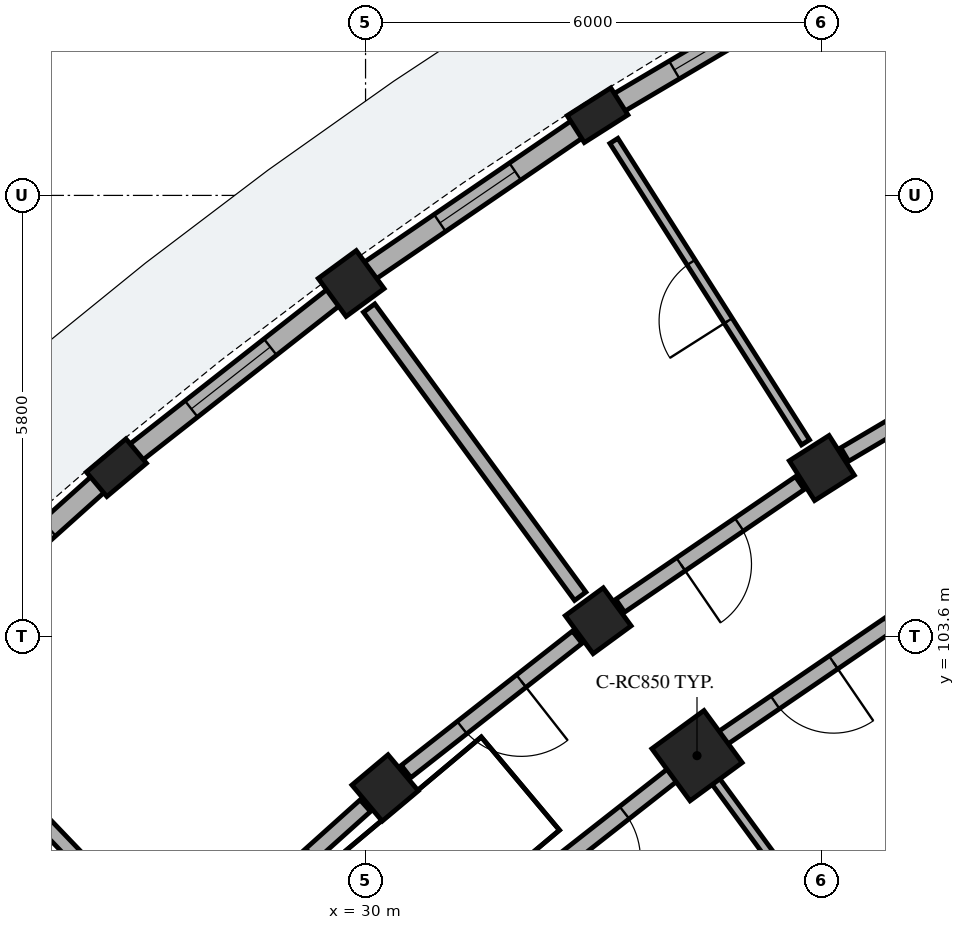
"""IFC4 building model, lengths in metres.
Left out: names, types, materials, properties, quantities, classifications, styles, units other than length and angle.
Written with IfcOpenShell. Run it as: python <this file> out.ifc"""

import sys

from ifc_helpers import new_model, si_unit, direction, frame, frame_2d, origin, origin_2d, place, context, subcontext, project, spatial, rectangle, extrude, element, fill, save


model = new_model("IFC4")
c1 = context("Model", 3, precision=1e-05, world=origin(), true_north=direction((0.0, 1.0)))
c2 = subcontext(c1, "Body", "Model", "MODEL_VIEW")
j1 = project(units=[si_unit("LENGTHUNIT", "METRE"), si_unit("PLANEANGLEUNIT", "RADIAN")], contexts=[c1])
p1 = place(None, origin())
s1 = spatial("IfcSite", under=j1, at=p1, CompositionType="ELEMENT")
p2 = place(p1, origin())
s2 = spatial("IfcBuilding", under=s1, at=p2, CompositionType="ELEMENT")
p3 = place(p2, origin())
s3 = spatial("IfcBuildingStorey", under=s2, at=p3, CompositionType="ELEMENT", Elevation=0.0)
p4 = place(p3, frame((36.003, 105.813, 0.0), z_axis=(0.0, 0.0, 1.0), x_axis=(-0.536481603385, 0.843912015099, 0.0)))
e1 = element("IfcColumn", 1, at=p4, inside=s3, PredefinedType="COLUMN", context=c2, shape_type="SweptSolid", body=[
    extrude(rectangle(XDim=0.62, YDim=0.62, at=origin_2d()), origin(), (0.0, 0.0, 1.0), 4.485),
])
p5 = place(p3, frame((33.052, 110.455, 0.0), z_axis=(0.0, 0.0, 1.0), x_axis=(-0.536481603385, 0.843912015099, 0.0)))
e2 = element("IfcColumn", 2, at=p5, inside=s3, PredefinedType="PILASTER", context=c2, shape_type="SweptSolid", body=[
    extrude(rectangle(XDim=0.42, YDim=0.68, at=origin_2d()), origin(), (0.0, 0.0, 1.0), 4.485),
])
p6 = place(p3, frame((34.361, 102.029, 0.0), z_axis=(0.0, 0.0, 1.0), x_axis=(-0.590918628541, 0.806731166153, 0.0)))
e3 = element("IfcColumn", 3, at=p6, inside=s3, PredefinedType="COLUMN", context=c2, shape_type="SweptSolid", body=[
    extrude(rectangle(XDim=0.85, YDim=0.85, at=origin_2d()), origin(), (0.0, 0.0, 1.0), 4.485),
])
for number, where, z_axis, x_axis in (
    (4, (33.061, 103.804, 0.0), (0.0, 0.0, 1.0), (-0.591, 0.807, 0.0)),
    (5, (29.811, 108.241, 0.0), (0.0, 0.0, 1.0), (-0.591, 0.807, 0.0)),
    (6, (30.257, 101.605, 0.0), (0.0, 0.0, 1.0), (-0.643, 0.766, 0.0)),
):
    element("IfcColumn", number, at=place(p3, frame(where, z_axis=z_axis, x_axis=x_axis)), inside=s3, PredefinedType="COLUMN", context=c2, shape_type="SweptSolid", body=[
        extrude(rectangle(XDim=0.62, YDim=0.62, at=origin_2d()), origin(), (0.0, 0.0, 1.0), 4.485),
    ])
p7 = place(p3, frame((26.722, 105.818, 0.0), z_axis=(0.0, 0.0, 1.0), x_axis=(-0.642787636427, 0.766044420681, 0.0)))
e7 = element("IfcColumn", 7, at=p7, inside=s3, PredefinedType="PILASTER", context=c2, shape_type="SweptSolid", body=[
    extrude(rectangle(XDim=0.42, YDim=0.68, at=origin_2d()), origin(), (0.0, 0.0, 1.0), 4.485),
])
p8 = place(p3, frame((36.192, 112.308, 0.0), z_axis=(0.0, 0.0, 1.0), x_axis=(-0.861120000949, -0.508401754487, 0.0)))
e8 = element("IfcWall", 8, at=p8, inside=s3, PredefinedType="SOLIDWALL", context=c2, shape_type="SweptSolid", body=[
    extrude(rectangle(XDim=3.466, YDim=0.27, at=frame_2d((1.733, 0.0))), origin(), (0.0, 0.0, 1.0), 3.755),
])
p9 = place(p8, frame((0.993, 0.0, 0.55)))
e9 = element("IfcOpeningElement", 9, at=p9, cuts=e8, PredefinedType="OPENING", context=c2, shape_type="SweptSolid", body=[
    extrude(rectangle(XDim=1.48, YDim=1.62, at=frame_2d((0.74, 0.81))), frame((0.0, 0.145, 0.0), z_axis=(0.0, -1.0, 0.0), x_axis=(1.0, 0.0, 0.0)), (0.0, 0.0, 1.0), 0.29),
])
p10 = place(p3, frame((32.904, 110.354, 0.0), z_axis=(0.0, 0.0, 1.0), x_axis=(-0.825744165268, -0.564044832904, 0.0)))
e10 = element("IfcWall", 10, at=p10, inside=s3, PredefinedType="SOLIDWALL", context=c2, shape_type="SweptSolid", body=[
    extrude(rectangle(XDim=3.466, YDim=0.27, at=frame_2d((1.733, 0.0))), origin(), (0.0, 0.0, 1.0), 3.755),
])
p11 = place(p10, frame((1.133, 0.0, 0.55)))
e11 = element("IfcOpeningElement", 11, at=p11, cuts=e10, PredefinedType="OPENING", context=c2, shape_type="SweptSolid", body=[
    extrude(rectangle(XDim=1.2, YDim=1.51, at=frame_2d((0.6, 0.755))), frame((0.0, 0.145, 0.0), z_axis=(0.0, -1.0, 0.0), x_axis=(1.0, 0.0, 0.0)), (0.0, 0.0, 1.0), 0.29),
])
p12 = place(p3, frame((29.591, 108.068, 0.0), z_axis=(0.0, 0.0, 1.0), x_axis=(-0.786811832484, -0.617192952214, 0.0)))
e12 = element("IfcWall", 12, at=p12, inside=s3, PredefinedType="SOLIDWALL", context=c2, shape_type="SweptSolid", body=[
    extrude(rectangle(XDim=3.466, YDim=0.27, at=frame_2d((1.733, 0.0))), origin(), (0.0, 0.0, 1.0), 3.755),
])
p13 = place(p12, frame((1.073, 0.0, 0.55)))
e13 = element("IfcOpeningElement", 13, at=p13, cuts=e12, PredefinedType="OPENING", context=c2, shape_type="SweptSolid", body=[
    extrude(rectangle(XDim=1.32, YDim=1.585, at=frame_2d((0.66, 0.792))), frame((0.0, 0.145, 0.0), z_axis=(0.0, -1.0, 0.0), x_axis=(1.0, 0.0, 0.0)), (0.0, 0.0, 1.0), 0.29),
])
p14 = place(p3, frame((26.588, 105.698, 0.0), z_axis=(0.0, 0.0, 1.0), x_axis=(-0.744424533251, -0.667706607945, 0.0)))
e14 = element("IfcWall", 14, at=p14, inside=s3, PredefinedType="SOLIDWALL", context=c2, shape_type="SweptSolid", body=[
    extrude(rectangle(XDim=3.466, YDim=0.27, at=frame_2d((1.733, 0.0))), origin(), (0.0, 0.0, 1.0), 3.755),
])
p15 = place(p14, frame((1.013, 0.0, 0.55)))
e15 = element("IfcOpeningElement", 15, at=p15, cuts=e14, PredefinedType="OPENING", context=c2, shape_type="SweptSolid", body=[
    extrude(rectangle(XDim=1.44, YDim=1.66, at=frame_2d((0.72, 0.83))), frame((0.0, 0.145, 0.0), z_axis=(0.0, -1.0, 0.0), x_axis=(1.0, 0.0, 0.0)), (0.0, 0.0, 1.0), 0.29),
])
p16 = place(p3, frame((38.77, 107.447, 0.0), z_axis=(0.0, 0.0, 1.0), x_axis=(-0.861113214678, -0.508413248753, 0.0)))
e16 = element("IfcWall", 16, at=p16, inside=s3, PredefinedType="PARTITIONING", context=c2, shape_type="SweptSolid", body=[
    extrude(rectangle(XDim=2.863, YDim=0.205, at=frame_2d((1.432, 0.0))), origin(), (0.0, 0.0, 1.0), 3.1),
])
p17 = place(p16, frame((0.957, 0.0, 0.0)))
e17 = element("IfcOpeningElement", 17, at=p17, cuts=e16, PredefinedType="OPENING", context=c2, shape_type="SweptSolid", body=[
    extrude(rectangle(XDim=0.95, YDim=2.13, at=frame_2d((0.475, 1.065))), frame((0.0, 0.113, 0.0), z_axis=(0.0, -1.0, 0.0), x_axis=(1.0, 0.0, 0.0)), (0.0, 0.0, 1.0), 0.225),
])
p18 = place(p3, frame((35.789, 106.151, 0.0), z_axis=(0.0, 0.0, 1.0), x_axis=(-0.536492262982, 0.843905238614, 0.0)))
e18 = element("IfcWall", 18, at=p18, inside=s3, PredefinedType="PARTITIONING", context=c2, shape_type="SweptSolid", body=[
    extrude(rectangle(XDim=4.7, YDim=0.125, at=frame_2d((2.35, 0.0))), origin(), (0.0, 0.0, 1.0), 3.1),
])
p19 = place(p18, frame((1.895, 0.0, 0.0)))
e19 = element("IfcOpeningElement", 19, at=p19, cuts=e18, PredefinedType="OPENING", context=c2, shape_type="SweptSolid", body=[
    extrude(rectangle(XDim=0.91, YDim=2.1, at=frame_2d((0.455, 1.05))), frame((0.0, 0.073, 0.0), z_axis=(0.0, -1.0, 0.0), x_axis=(1.0, 0.0, 0.0)), (0.0, 0.0, 1.0), 0.145),
])
p20 = place(p3, frame((35.714, 105.616, 0.0), z_axis=(0.0, 0.0, 1.0), x_axis=(-0.825779671787, -0.563992848947, 0.0)))
e20 = element("IfcWall", 20, at=p20, inside=s3, PredefinedType="PARTITIONING", context=c2, shape_type="SweptSolid", body=[
    extrude(rectangle(XDim=2.863, YDim=0.205, at=frame_2d((1.432, 0.0))), origin(), (0.0, 0.0, 1.0), 3.1),
])
p21 = place(p20, frame((0.967, 0.0, 0.0)))
e21 = element("IfcOpeningElement", 21, at=p21, cuts=e20, PredefinedType="OPENING", context=c2, shape_type="SweptSolid", body=[
    extrude(rectangle(XDim=0.93, YDim=2.12, at=frame_2d((0.465, 1.06))), frame((0.0, 0.113, 0.0), z_axis=(0.0, -1.0, 0.0), x_axis=(1.0, 0.0, 0.0)), (0.0, 0.0, 1.0), 0.225),
])
p22 = place(p3, frame((36.895, 103.76, 0.0), z_axis=(0.0, 0.0, 1.0), x_axis=(-0.825752009056, -0.56403334967, 0.0)))
e22 = element("IfcWall", 22, at=p22, inside=s3, PredefinedType="PARTITIONING", context=c2, shape_type="SweptSolid", body=[
    extrude(rectangle(XDim=2.718, YDim=0.205, at=frame_2d((1.359, 0.0))), origin(), (0.0, 0.0, 1.0), 3.1),
])
p23 = place(p22, frame((0.894, 0.0, 0.0)))
e23 = element("IfcOpeningElement", 23, at=p23, cuts=e22, PredefinedType="OPENING", context=c2, shape_type="SweptSolid", body=[
    extrude(rectangle(XDim=0.93, YDim=2.12, at=frame_2d((0.465, 1.06))), frame((0.0, 0.113, 0.0), z_axis=(0.0, -1.0, 0.0), x_axis=(1.0, 0.0, 0.0)), (0.0, 0.0, 1.0), 0.225),
])
p24 = place(p3, frame((32.824, 104.126, 0.0), z_axis=(0.0, 0.0, 1.0), x_axis=(-0.590910940129, 0.806736797745, 0.0)))
e24 = element("IfcWall", 24, at=p24, inside=s3, PredefinedType="PARTITIONING", context=c2, shape_type="SweptSolid", body=[
    extrude(rectangle(XDim=4.7, YDim=0.185, at=frame_2d((2.35, 0.0))), origin(), (0.0, 0.0, 1.0), 3.1),
])
p25 = place(p3, frame((38.497, 96.382, 0.0), z_axis=(0.0, 0.0, 1.0), x_axis=(-0.590924179316, 0.806727100263, 0.0)))
e25 = element("IfcWall", 25, at=p25, inside=s3, PredefinedType="PARTITIONING", context=c2, shape_type="SweptSolid", body=[
    extrude(rectangle(XDim=6.6, YDim=0.125, at=frame_2d((3.3, 0.0))), origin(), (0.0, 0.0, 1.0), 3.1),
])
p26 = place(p25, frame((2.865, 0.0, 0.0)))
e26 = element("IfcOpeningElement", 26, at=p26, cuts=e25, PredefinedType="OPENING", context=c2, shape_type="SweptSolid", body=[
    extrude(rectangle(XDim=0.87, YDim=2.08, at=frame_2d((0.435, 1.04))), frame((0.0, 0.073, 0.0), z_axis=(0.0, -1.0, 0.0), x_axis=(1.0, 0.0, 0.0)), (0.0, 0.0, 1.0), 0.145),
])
p27 = place(p3, frame((32.785, 103.588, 0.0), z_axis=(0.0, 0.0, 1.0), x_axis=(-0.786806323554, -0.617199975061, 0.0)))
e27 = element("IfcWall", 27, at=p27, inside=s3, PredefinedType="PARTITIONING", context=c2, shape_type="SweptSolid", body=[
    extrude(rectangle(XDim=2.863, YDim=0.205, at=frame_2d((1.432, 0.0))), origin(), (0.0, 0.0, 1.0), 3.1),
])
p28 = place(p27, frame((0.937, 0.0, 0.0)))
e28 = element("IfcOpeningElement", 28, at=p28, cuts=e27, PredefinedType="OPENING", context=c2, shape_type="SweptSolid", body=[
    extrude(rectangle(XDim=0.99, YDim=2.16, at=frame_2d((0.495, 1.08))), frame((0.0, 0.113, 0.0), z_axis=(0.0, -1.0, 0.0), x_axis=(1.0, 0.0, 0.0)), (0.0, 0.0, 1.0), 0.225),
])
p29 = place(p3, frame((34.085, 101.813, 0.0), z_axis=(0.0, 0.0, 1.0), x_axis=(-0.786835457019, -0.617162833924, 0.0)))
e29 = element("IfcWall", 29, at=p29, inside=s3, PredefinedType="PARTITIONING", context=c2, shape_type="SweptSolid", body=[
    extrude(rectangle(XDim=2.718, YDim=0.205, at=frame_2d((1.359, 0.0))), origin(), (0.0, 0.0, 1.0), 3.1),
])
p30 = place(p29, frame((0.864, 0.0, 0.0)))
e30 = element("IfcOpeningElement", 30, at=p30, cuts=e29, PredefinedType="OPENING", context=c2, shape_type="SweptSolid", body=[
    extrude(rectangle(XDim=0.99, YDim=2.16, at=frame_2d((0.495, 1.08))), frame((0.0, 0.113, 0.0), z_axis=(0.0, -1.0, 0.0), x_axis=(1.0, 0.0, 0.0)), (0.0, 0.0, 1.0), 0.225),
])
p31 = place(p3, frame((29.997, 101.371, 0.0), z_axis=(0.0, 0.0, 1.0), x_axis=(-0.744433521088, -0.667696587291, 0.0)))
e31 = element("IfcWall", 31, at=p31, inside=s3, PredefinedType="PARTITIONING", context=c2, shape_type="SweptSolid", body=[
    extrude(rectangle(XDim=2.863, YDim=0.205, at=frame_2d((1.432, 0.0))), origin(), (0.0, 0.0, 1.0), 3.1),
])
p32 = place(p31, frame((0.947, 0.0, 0.0)))
e32 = element("IfcOpeningElement", 32, at=p32, cuts=e31, PredefinedType="OPENING", context=c2, shape_type="SweptSolid", body=[
    extrude(rectangle(XDim=0.97, YDim=2.15, at=frame_2d((0.485, 1.075))), frame((0.0, 0.113, 0.0), z_axis=(0.0, -1.0, 0.0), x_axis=(1.0, 0.0, 0.0)), (0.0, 0.0, 1.0), 0.225),
])
p33 = place(p3, frame((27.328, 99.514, 0.0), z_axis=(0.0, 0.0, 1.0), x_axis=(-0.691882799356, 0.722009828157, 0.0)))
e33 = element("IfcWall", 33, at=p33, inside=s3, PredefinedType="PARTITIONING", context=c2, shape_type="SweptSolid", body=[
    extrude(rectangle(XDim=4.7, YDim=0.185, at=frame_2d((2.35, 0.0))), origin(), (0.0, 0.0, 1.0), 3.1),
])
p34 = place(p9, origin())
e34 = element("IfcWindow", 34, at=p34, inside=s3, PartitioningType="SINGLE_PANEL", PredefinedType="WINDOW", context=c2, shape_type="SweptSolid", body=[
    extrude(rectangle(XDim=1.48, YDim=1.62, at=frame_2d((0.74, 0.81))), frame((0.0, 0.03, 0.0), z_axis=(0.0, -1.0, 0.0), x_axis=(1.0, 0.0, 0.0)), (0.0, 0.0, 1.0), 0.06),
])
fill(e9, e34)
p35 = place(p11, origin())
e35 = element("IfcWindow", 35, at=p35, inside=s3, PartitioningType="SINGLE_PANEL", PredefinedType="WINDOW", context=c2, shape_type="SweptSolid", body=[
    extrude(rectangle(XDim=1.2, YDim=1.51, at=frame_2d((0.6, 0.755))), frame((0.0, 0.03, 0.0), z_axis=(0.0, -1.0, 0.0), x_axis=(1.0, 0.0, 0.0)), (0.0, 0.0, 1.0), 0.06),
])
fill(e11, e35)
p36 = place(p13, origin())
e36 = element("IfcWindow", 36, at=p36, inside=s3, PartitioningType="SINGLE_PANEL", PredefinedType="WINDOW", context=c2, shape_type="SweptSolid", body=[
    extrude(rectangle(XDim=1.32, YDim=1.585, at=frame_2d((0.66, 0.792))), frame((0.0, 0.03, 0.0), z_axis=(0.0, -1.0, 0.0), x_axis=(1.0, 0.0, 0.0)), (0.0, 0.0, 1.0), 0.06),
])
fill(e13, e36)
p37 = place(p19, origin())
e37 = element("IfcDoor", 37, at=p37, inside=s3, OperationType="SINGLE_SWING_LEFT", PredefinedType="DOOR", context=c2, shape_type="SweptSolid", body=[
    extrude(rectangle(XDim=0.91, YDim=2.1, at=frame_2d((0.455, 1.05))), frame((0.0, 0.025, 0.0), z_axis=(0.0, -1.0, 0.0), x_axis=(1.0, 0.0, 0.0)), (0.0, 0.0, 1.0), 0.05),
])
fill(e19, e37)
p38 = place(p21, origin())
e38 = element("IfcDoor", 38, at=p38, inside=s3, OperationType="SINGLE_SWING_RIGHT", PredefinedType="DOOR", context=c2, shape_type="SweptSolid", body=[
    extrude(rectangle(XDim=0.93, YDim=2.12, at=frame_2d((0.465, 1.06))), frame((0.0, 0.025, 0.0), z_axis=(0.0, -1.0, 0.0), x_axis=(1.0, 0.0, 0.0)), (0.0, 0.0, 1.0), 0.05),
])
fill(e21, e38)
p39 = place(p23, origin())
e39 = element("IfcDoor", 39, at=p39, inside=s3, OperationType="SINGLE_SWING_LEFT", PredefinedType="DOOR", context=c2, shape_type="SweptSolid", body=[
    extrude(rectangle(XDim=0.93, YDim=2.12, at=frame_2d((0.465, 1.06))), frame((0.0, 0.025, 0.0), z_axis=(0.0, -1.0, 0.0), x_axis=(1.0, 0.0, 0.0)), (0.0, 0.0, 1.0), 0.05),
])
fill(e23, e39)
p40 = place(p28, origin())
e40 = element("IfcDoor", 40, at=p40, inside=s3, OperationType="SINGLE_SWING_LEFT", PredefinedType="DOOR", context=c2, shape_type="SweptSolid", body=[
    extrude(rectangle(XDim=0.99, YDim=2.16, at=frame_2d((0.495, 1.08))), frame((0.0, 0.025, 0.0), z_axis=(0.0, -1.0, 0.0), x_axis=(1.0, 0.0, 0.0)), (0.0, 0.0, 1.0), 0.05),
])
fill(e28, e40)
p41 = place(p30, origin())
e41 = element("IfcDoor", 41, at=p41, inside=s3, OperationType="SINGLE_SWING_RIGHT", PredefinedType="DOOR", context=c2, shape_type="SweptSolid", body=[
    extrude(rectangle(XDim=0.99, YDim=2.16, at=frame_2d((0.495, 1.08))), frame((0.0, 0.025, 0.0), z_axis=(0.0, -1.0, 0.0), x_axis=(1.0, 0.0, 0.0)), (0.0, 0.0, 1.0), 0.05),
])
fill(e30, e41)
save(model, sys.argv[1])
